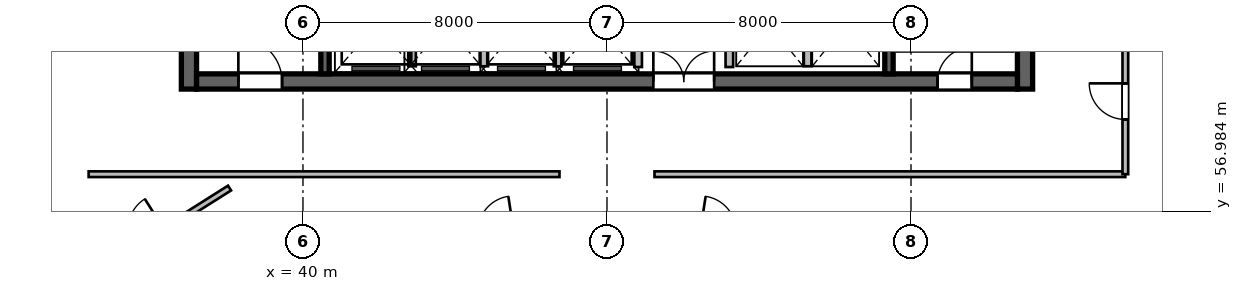
"""IFC4 building model, lengths in metres.
Left out: names, types, materials, properties, quantities, classifications, styles, units other than length and angle.
Written with IfcOpenShell. Run it as: python <this file> out.ifc"""

import sys

from ifc_helpers import new_model, si_unit, direction, frame, frame_2d, origin, place, context, subcontext, project, spatial, rectangle, extrude, source, transform, mapped, element, fill, save


model = new_model("IFC4")
c1 = context("Model", 3, precision=1e-05, world=origin(), true_north=direction((0.0, 1.0)))
c2 = subcontext(c1, "Body", "Model", "MODEL_VIEW")
j1 = project(units=[si_unit("LENGTHUNIT", "METRE"), si_unit("PLANEANGLEUNIT", "RADIAN")], contexts=[c1])
p1 = place(None, origin())
s1 = spatial("IfcSite", under=j1, at=p1, CompositionType="ELEMENT")
p2 = place(p1, origin())
s2 = spatial("IfcBuilding", under=s1, at=p2, CompositionType="ELEMENT")
p3 = place(p2, frame((0.0, 0.0, 275.7)))
s3 = spatial("IfcBuildingStorey", under=s2, at=p3, CompositionType="ELEMENT", Elevation=275.7)
m1 = source(origin(), c2, "Body", "SweptSolid", [
    extrude(rectangle(XDim=12.0, YDim=0.4, at=frame_2d((6.0, 0.0))), origin(), (0.0, 0.0, 1.0), 3.9),
])
for number, where, z_axis, x_axis in (
    (1, (37.0, 60.2, 0.0), (0.0, 0.0, 1.0), (0.0, 1.0, 0.0)),
    (2, (59.0, 60.2, 0.0), (0.0, 0.0, 1.0), (0.0, 1.0, 0.0)),
):
    element("IfcWall", number, at=place(p3, frame(where, z_axis=z_axis, x_axis=x_axis)), inside=s3, PredefinedType="SHEAR", context=c2, shape_type="MappedRepresentation", body=[
        mapped(m1, transform((0.0, 0.0, 0.0), scale=1.0)),
    ])
m2 = source(origin(), c2, "Body", "SweptSolid", [
    extrude(rectangle(XDim=21.6, YDim=0.4, at=frame_2d((10.8, 0.0))), origin(), (0.0, 0.0, 1.0), 3.9),
])
p4 = place(p3, frame((37.2, 60.4, 0.0), z_axis=(0.0, 0.0, 1.0), x_axis=(1.0, 0.0, 0.0)))
e3 = element("IfcWall", 3, at=p4, inside=s3, PredefinedType="SHEAR", context=c2, shape_type="MappedRepresentation", body=[
    mapped(m2, transform((0.0, 0.0, 0.0), scale=1.0)),
])
p5 = place(p4, frame((1.1, 0.0, 0.0)))
e4 = element("IfcOpeningElement", 4, at=p5, cuts=e3, PredefinedType="OPENING", context=c2, shape_type="SweptSolid", body=[
    extrude(rectangle(XDim=1.15, YDim=2.15, at=frame_2d((0.575, 1.075))), frame((0.0, 0.21, 0.0), z_axis=(0.0, -1.0, 0.0), x_axis=(1.0, 0.0, 0.0)), (0.0, 0.0, 1.0), 0.42),
])
p6 = place(p4, frame((19.5, 0.0, 0.0)))
e5 = element("IfcOpeningElement", 5, at=p6, cuts=e3, PredefinedType="OPENING", context=c2, shape_type="SweptSolid", body=[
    extrude(rectangle(XDim=0.9, YDim=2.1, at=frame_2d((0.45, 1.05))), frame((0.0, 0.21, 0.0), z_axis=(0.0, -1.0, 0.0), x_axis=(1.0, 0.0, 0.0)), (0.0, 0.0, 1.0), 0.42),
])
p7 = place(p4, frame((12.02, 0.0, 0.0)))
e6 = element("IfcOpeningElement", 6, at=p7, cuts=e3, PredefinedType="OPENING", context=c2, shape_type="SweptSolid", body=[
    extrude(rectangle(XDim=1.6, YDim=2.15, at=frame_2d((0.8, 1.075))), frame((0.0, 0.21, 0.0), z_axis=(0.0, -1.0, 0.0), x_axis=(1.0, 0.0, 0.0)), (0.0, 0.0, 1.0), 0.42),
])
m3 = source(origin(), c2, "Body", "SweptSolid", [
    extrude(rectangle(XDim=11.2, YDim=0.22, at=frame_2d((5.6, 0.0))), origin(), (0.0, 0.0, 1.0), 3.9),
])
p8 = place(p3, frame((40.58, 60.6, 0.0), z_axis=(0.0, 0.0, 1.0), x_axis=(0.0, 1.0, 0.0)))
e7 = element("IfcWall", 7, at=p8, inside=s3, PredefinedType="SHEAR", context=c2, shape_type="MappedRepresentation", body=[
    mapped(m3, transform((0.0, 0.0, 0.0), scale=1.0)),
])
p9 = place(p3, frame((55.42, 60.6, 0.0), z_axis=(0.0, 0.0, 1.0), x_axis=(0.0, 1.0, 0.0)))
e8 = element("IfcWall", 8, at=p9, inside=s3, PredefinedType="SHEAR", context=c2, shape_type="MappedRepresentation", body=[
    mapped(m3, transform((0.0, 0.0, 0.0), scale=1.0)),
])
p10 = place(p9, frame((9.645, 0.0, 0.0)))
e9 = element("IfcOpeningElement", 9, at=p10, cuts=e8, PredefinedType="OPENING", context=c2, shape_type="SweptSolid", body=[
    extrude(rectangle(XDim=1.15, YDim=2.15, at=frame_2d((0.575, 1.075))), frame((0.0, 0.12, 0.0), z_axis=(0.0, -1.0, 0.0), x_axis=(1.0, 0.0, 0.0)), (0.0, 0.0, 1.0), 0.24),
])
m4 = source(origin(), c2, "Body", "SweptSolid", [
    extrude(rectangle(XDim=2.24, YDim=0.2, at=frame_2d((1.12, 0.0))), origin(), (0.0, 0.0, 1.0), 3.64),
])
for number, where, z_axis, x_axis in (
    (10, (48.82, 60.78, 0.0), (0.0, 0.0, 1.0), (0.0, 1.0, 0.0)),
    (11, (51.22, 60.78, 0.0), (0.0, 0.0, 1.0), (0.0, 1.0, 0.0)),
):
    element("IfcWall", number, at=place(p3, frame(where, z_axis=z_axis, x_axis=x_axis)), inside=s3, PredefinedType="SOLIDWALL", context=c2, shape_type="MappedRepresentation", body=[
        mapped(m4, transform((0.0, 0.0, 0.0), scale=1.0)),
    ])
m5 = source(origin(), c2, "Body", "SweptSolid", [
    extrude(rectangle(XDim=2.2, YDim=0.2, at=frame_2d((1.1, 0.0))), origin(), (0.0, 0.0, 1.0), 3.64),
])
for number, where, z_axis, x_axis in (
    (12, (42.87, 60.8, 0.0), (0.0, 0.0, 1.0), (0.0, 1.0, 0.0)),
    (13, (44.77, 60.8, 0.0), (0.0, 0.0, 1.0), (0.0, 1.0, 0.0)),
    (14, (46.7, 60.8, 0.0), (0.0, 0.0, 1.0), (0.0, 1.0, 0.0)),
    (15, (53.28, 60.8, 0.0), (0.0, 0.0, 1.0), (0.0, 1.0, 0.0)),
):
    element("IfcWall", number, at=place(p3, frame(where, z_axis=z_axis, x_axis=x_axis)), inside=s3, PredefinedType="SOLIDWALL", context=c2, shape_type="MappedRepresentation", body=[
        mapped(m5, transform((0.0, 0.0, 0.0), scale=1.0)),
    ])
m6 = source(origin(), c2, "Body", "SweptSolid", [
    extrude(rectangle(XDim=17.556, YDim=0.15, at=frame_2d((8.778, 0.0))), origin(), (0.0, 0.0, 1.0), 3.64),
])
p11 = place(p3, frame((33.8, 54.958, 0.0), z_axis=(0.0, 0.0, 1.0), x_axis=(-0.395687598313, 0.918385172213, 0.0)))
e16 = element("IfcWall", 16, at=p11, inside=s3, PredefinedType="PARTITIONING", context=c2, shape_type="MappedRepresentation", body=[
    mapped(m6, transform((0.0, 0.0, 0.0), scale=1.0)),
])
m7 = source(origin(), c2, "Body", "SweptSolid", [
    extrude(rectangle(XDim=5.025, YDim=0.15, at=frame_2d((2.513, 0.0))), origin(), (0.0, 0.0, 1.0), 3.64),
])
p12 = place(p3, frame((33.82, 54.911, 0.0), z_axis=(0.0, 0.0, 1.0), x_axis=(0.84532378062, 0.534254345717, 0.0)))
e17 = element("IfcWall", 17, at=p12, inside=s3, PredefinedType="PARTITIONING", context=c2, shape_type="MappedRepresentation", body=[
    mapped(m7, transform((0.0, 0.0, 0.0), scale=1.0)),
])
p13 = place(p12, frame((2.038, 0.0, 0.0)))
e18 = element("IfcOpeningElement", 18, at=p13, cuts=e17, PredefinedType="OPENING", context=c2, shape_type="SweptSolid", body=[
    extrude(rectangle(XDim=0.95, YDim=2.1, at=frame_2d((0.475, 1.05))), frame((0.0, 0.085, 0.0), z_axis=(0.0, -1.0, 0.0), x_axis=(1.0, 0.0, 0.0)), (0.0, 0.0, 1.0), 0.17),
])
m8 = source(origin(), c2, "Body", "SweptSolid", [
    extrude(rectangle(XDim=12.39, YDim=0.15, at=frame_2d((6.195, 0.0))), origin(), (0.0, 0.0, 1.0), 3.27),
])
for number, where, z_axis, x_axis in (
    (19, (34.36, 57.96, 0.0), (0.0, 0.0, 1.0), (1.0, 0.0, 0.0)),
    (20, (49.25, 57.96, 0.0), (0.0, 0.0, 1.0), (1.0, 0.0, 0.0)),
):
    element("IfcWall", number, at=place(p3, frame(where, z_axis=z_axis, x_axis=x_axis)), inside=s3, PredefinedType="PARTITIONING", context=c2, shape_type="MappedRepresentation", body=[
        mapped(m8, transform((0.0, 0.0, 0.0), scale=1.0)),
    ])
m9 = source(origin(), c2, "Body", "SweptSolid", [
    extrude(rectangle(XDim=5.04, YDim=0.15, at=frame_2d((2.52, 0.0))), origin(), (0.0, 0.0, 1.0), 3.64),
])
p14 = place(p3, frame((61.64, 57.96, 0.0), z_axis=(0.0, 0.0, 1.0), x_axis=(0.0, 1.0, 0.0)))
e21 = element("IfcWall", 21, at=p14, inside=s3, PredefinedType="PARTITIONING", context=c2, shape_type="MappedRepresentation", body=[
    mapped(m9, transform((0.0, 0.0, 0.0), scale=1.0)),
])
p15 = place(p14, frame((1.44, 0.0, 0.0)))
e22 = element("IfcOpeningElement", 22, at=p15, cuts=e21, PredefinedType="OPENING", context=c2, shape_type="SweptSolid", body=[
    extrude(rectangle(XDim=0.95, YDim=2.1, at=frame_2d((0.475, 1.05))), frame((0.0, 0.085, 0.0), z_axis=(0.0, -1.0, 0.0), x_axis=(1.0, 0.0, 0.0)), (0.0, 0.0, 1.0), 0.17),
])
m10 = source(origin(), c2, "Body", "SweptSolid", [
    extrude(rectangle(XDim=1.15, YDim=2.15, at=frame_2d((0.575, 1.075))), frame((0.0, 0.025, 0.0), z_axis=(0.0, -1.0, 0.0), x_axis=(1.0, 0.0, 0.0)), (0.0, 0.0, 1.0), 0.05),
])
p16 = place(p5, origin())
e23 = element("IfcDoor", 23, at=p16, inside=s3, OperationType="SINGLE_SWING_LEFT", PredefinedType="DOOR", context=c2, shape_type="MappedRepresentation", body=[
    mapped(m10, transform((0.0, 0.0, 0.0), scale=1.0)),
])
fill(e4, e23)
m11 = source(origin(), c2, "Body", "SweptSolid", [
    extrude(rectangle(XDim=0.9, YDim=2.1, at=frame_2d((0.45, 1.05))), frame((0.0, 0.025, 0.0), z_axis=(0.0, -1.0, 0.0), x_axis=(1.0, 0.0, 0.0)), (0.0, 0.0, 1.0), 0.05),
])
p17 = place(p6, origin())
e24 = element("IfcDoor", 24, at=p17, inside=s3, OperationType="SINGLE_SWING_RIGHT", PredefinedType="DOOR", context=c2, shape_type="MappedRepresentation", body=[
    mapped(m11, transform((0.0, 0.0, 0.0), scale=1.0)),
])
fill(e5, e24)
m12 = source(origin(), c2, "Body", "SweptSolid", [
    extrude(rectangle(XDim=1.6, YDim=2.15, at=frame_2d((0.8, 1.075))), frame((0.0, 0.025, 0.0), z_axis=(0.0, -1.0, 0.0), x_axis=(1.0, 0.0, 0.0)), (0.0, 0.0, 1.0), 0.05),
])
p18 = place(p7, origin())
e25 = element("IfcDoor", 25, at=p18, inside=s3, OperationType="DOUBLE_DOOR_SINGLE_SWING", PredefinedType="DOOR", context=c2, shape_type="MappedRepresentation", body=[
    mapped(m12, transform((0.0, 0.0, 0.0), scale=1.0)),
])
fill(e6, e25)
m13 = source(origin(), c2, "Body", "SweptSolid", [
    extrude(rectangle(XDim=0.95, YDim=2.1, at=frame_2d((0.475, 1.05))), frame((0.0, 0.025, 0.0), z_axis=(0.0, -1.0, 0.0), x_axis=(1.0, 0.0, 0.0)), (0.0, 0.0, 1.0), 0.05),
])
p19 = place(p15, origin())
e26 = element("IfcDoor", 26, at=p19, inside=s3, OperationType="SINGLE_SWING_RIGHT", PredefinedType="DOOR", context=c2, shape_type="MappedRepresentation", body=[
    mapped(m13, transform((0.0, 0.0, 0.0), scale=1.0)),
])
fill(e22, e26)
save(model, sys.argv[1])
